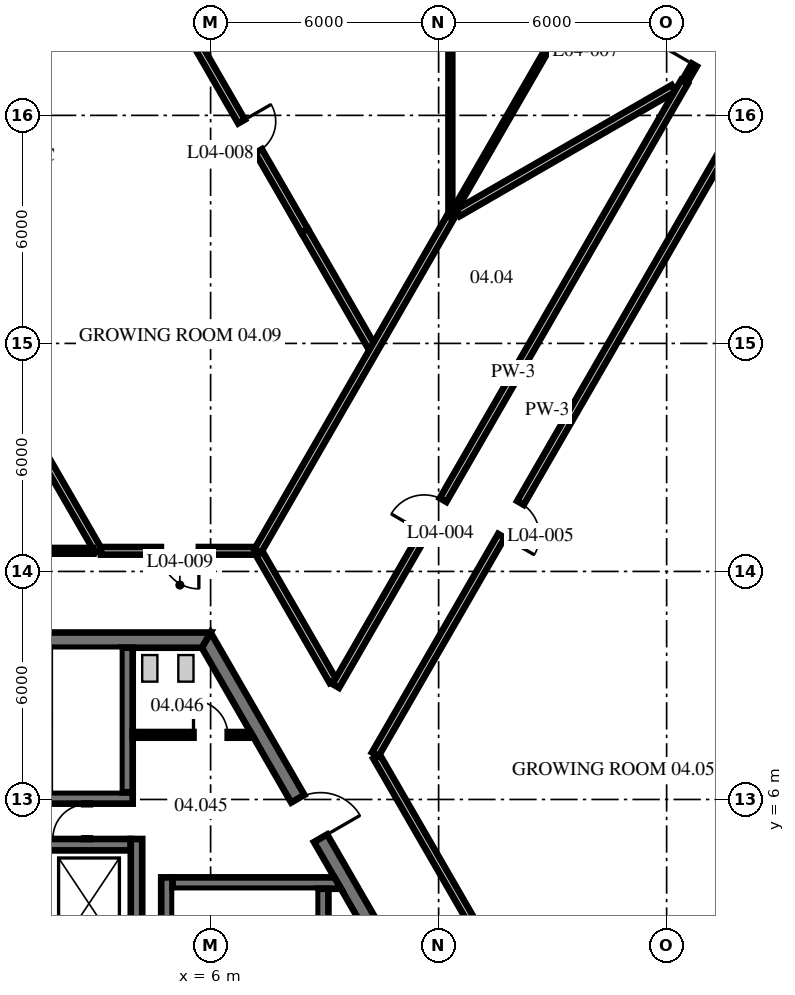
"""IFC4 building model, lengths in metres.
Left out: names, types, materials, properties, quantities, classifications, styles, units other than length and angle.
Written with IfcOpenShell. Run it as: python <this file> out.ifc"""

import sys

from ifc_helpers import new_model, si_unit, direction, frame, frame_2d, origin, place, context, subcontext, project, spatial, polyline, rectangle, outline, extrude, source, transform, mapped, element, fill, save


model = new_model("IFC4")
c1 = context("Model", 3, precision=1e-05, world=origin(), true_north=direction((0.0, 1.0)))
c2 = subcontext(c1, "Body", "Model", "MODEL_VIEW")
j1 = project(units=[si_unit("LENGTHUNIT", "METRE"), si_unit("PLANEANGLEUNIT", "RADIAN")], contexts=[c1])
p1 = place(None, origin())
s1 = spatial("IfcSite", under=j1, at=p1, CompositionType="ELEMENT")
p2 = place(p1, origin())
s2 = spatial("IfcBuilding", under=s1, at=p2, CompositionType="ELEMENT")
p3 = place(p2, frame((0.0, 0.0, 20.3)))
s3 = spatial("IfcBuildingStorey", under=s2, at=p3, CompositionType="ELEMENT", Elevation=20.3)
m1 = source(origin(), c2, "Body", "SweptSolid", [
    extrude(outline(polyline([(-0.115, -0.2), (11.885, -0.2), (11.654, 0.2), (0.115, 0.2), (-0.115, -0.2)])), origin(), (0.0, 0.0, 1.0), 4.1),
])
p4 = place(p3, frame((11.769, 0.0, 0.0), z_axis=(0.0, 0.0, 1.0), x_axis=(-0.499996592174, 0.866027371285, 0.0)))
e1 = element("IfcWall", 1, at=p4, inside=s3, PredefinedType="SHEAR", context=c2, shape_type="MappedRepresentation", body=[
    mapped(m1, transform((0.0, 0.0, 0.0), scale=1.0)),
])
p5 = place(p4, frame((5.75, 0.0, 0.0)))
e2 = element("IfcOpeningElement", 2, at=p5, cuts=e1, PredefinedType="OPENING", context=c2, shape_type="SweptSolid", body=[
    extrude(rectangle(XDim=1.2, YDim=2.1, at=frame_2d((0.6, 1.05))), frame((0.0, 0.21, 0.0), z_axis=(0.0, -1.0, 0.0), x_axis=(1.0, 0.0, 0.0)), (0.0, 0.0, 1.0), 0.42),
])
p6 = place(p3, frame((5.885, 10.192, 0.0), z_axis=(0.0, 0.0, 1.0), x_axis=(-1.0, 0.0, 0.0)))
e3 = element("IfcWall", 3, at=p6, inside=s3, PredefinedType="SHEAR", context=c2, shape_type="MappedRepresentation", body=[
    mapped(m1, transform((0.0, 0.0, 0.0), scale=1.0)),
])
p7 = place(p6, frame((7.985, 0.0, 0.0)))
e4 = element("IfcOpeningElement", 4, at=p7, cuts=e3, PredefinedType="OPENING", context=c2, shape_type="SweptSolid", body=[
    extrude(rectangle(XDim=1.2, YDim=2.1, at=frame_2d((0.6, 1.05))), frame((0.0, 0.21, 0.0), z_axis=(0.0, -1.0, 0.0), x_axis=(1.0, 0.0, 0.0)), (0.0, 0.0, 1.0), 0.42),
])
m2 = source(origin(), c2, "Body", "SweptSolid", [
    extrude(rectangle(XDim=2.5, YDim=0.3, at=frame_2d((1.25, 0.0))), origin(), (0.0, 0.0, 1.0), 4.1),
])
p8 = place(p3, frame((1.4, 4.81, 0.0), z_axis=(0.0, 0.0, 1.0), x_axis=(1.0, 0.0, 0.0)))
e5 = element("IfcWall", 5, at=p8, inside=s3, PredefinedType="SHEAR", context=c2, shape_type="MappedRepresentation", body=[
    mapped(m2, transform((0.0, 0.0, 0.0), scale=1.0)),
])
m3 = source(origin(), c2, "Body", "SweptSolid", [
    extrude(rectangle(XDim=2.9, YDim=0.3, at=frame_2d((1.45, 0.0))), origin(), (0.0, 0.0, 1.0), 4.1),
])
p9 = place(p3, frame((4.05, 2.06, 0.0), z_axis=(0.0, 0.0, 1.0), x_axis=(0.0, 1.0, 0.0)))
e6 = element("IfcWall", 6, at=p9, inside=s3, PredefinedType="SHEAR", context=c2, shape_type="MappedRepresentation", body=[
    mapped(m3, transform((0.0, 0.0, 0.0), scale=1.0)),
])
m4 = source(origin(), c2, "Body", "SweptSolid", [
    extrude(outline(polyline([(-0.15, -0.15), (9.99, -0.15), (9.99, 0.15), (0.15, 0.15), (-0.15, -0.15)])), origin(), (0.0, 0.0, 1.0), 4.1),
])
p10 = place(p3, frame((4.85, -6.04, 0.0), z_axis=(0.0, 0.0, 1.0), x_axis=(0.0, 1.0, 0.0)))
e7 = element("IfcWall", 7, at=p10, inside=s3, PredefinedType="SHEAR", context=c2, shape_type="MappedRepresentation", body=[
    mapped(m4, transform((0.0, 0.0, 0.0), scale=1.0)),
])
p11 = place(p10, frame((3.19, 0.0, 0.0)))
e8 = element("IfcOpeningElement", 8, at=p11, cuts=e7, PredefinedType="OPENING", context=c2, shape_type="SweptSolid", body=[
    extrude(rectangle(XDim=1.1, YDim=2.1, at=frame_2d((0.55, 1.05))), frame((0.0, 0.16, 0.0), z_axis=(0.0, -1.0, 0.0), x_axis=(1.0, 0.0, 0.0)), (0.0, 0.0, 1.0), 0.32),
])
m5 = source(origin(), c2, "Body", "SweptSolid", [
    extrude(outline(polyline([(0.0, -0.15), (0.0, 0.15), (4.26, 0.15), (4.433, -0.15), (0.0, -0.15)])), origin(), (0.0, 0.0, 1.0), 4.1),
])
p12 = place(p3, frame((5.0, 3.8, 0.0), z_axis=(0.0, 0.0, 1.0), x_axis=(1.0, 0.0, 0.0)))
e9 = element("IfcWall", 9, at=p12, inside=s3, PredefinedType="SHEAR", context=c2, shape_type="MappedRepresentation", body=[
    mapped(m5, transform((0.0, 0.0, 0.0), scale=1.0)),
])
m6 = source(origin(), c2, "Body", "SweptSolid", [
    extrude(rectangle(XDim=7.3, YDim=0.3, at=frame_2d((3.65, 0.0))), origin(), (0.0, 0.0, 1.0), 4.1),
])
p13 = place(p3, frame((8.95, -3.65, 0.0), z_axis=(0.0, 0.0, 1.0), x_axis=(0.0, 1.0, 0.0)))
e10 = element("IfcWall", 10, at=p13, inside=s3, PredefinedType="SHEAR", context=c2, shape_type="MappedRepresentation", body=[
    mapped(m6, transform((0.0, 0.0, 0.0), scale=1.0)),
])
m7 = source(origin(), c2, "Body", "SweptSolid", [
    extrude(rectangle(XDim=7.9, YDim=0.3, at=frame_2d((3.95, 0.0))), origin(), (0.0, 0.0, 1.0), 4.1),
])
p14 = place(p3, frame((-3.95, 6.04, 0.0), z_axis=(0.0, 0.0, 1.0), x_axis=(1.0, 0.0, 0.0)))
e11 = element("IfcWall", 11, at=p14, inside=s3, PredefinedType="SHEAR", context=c2, shape_type="MappedRepresentation", body=[
    mapped(m7, transform((0.0, 0.0, 0.0), scale=1.0)),
])
m8 = source(origin(), c2, "Body", "SweptSolid", [
    extrude(outline(polyline([(0.0, -0.15), (0.0, 0.15), (3.804, 0.15), (3.804, -0.15), (0.0, -0.15)])), origin(), (0.0, 0.0, 1.0), 4.1),
])
p15 = place(p3, frame((3.8, 6.19, 0.0), z_axis=(0.0, 0.0, 1.0), x_axis=(0.0, 1.0, 0.0)))
e12 = element("IfcWall", 12, at=p15, inside=s3, PredefinedType="SHEAR", context=c2, shape_type="MappedRepresentation", body=[
    mapped(m8, transform((0.0, 0.0, 0.0), scale=1.0)),
])
m9 = source(origin(), c2, "Body", "SweptSolid", [
    extrude(outline(polyline([(0.0, -0.075), (0.0, 0.075), (3.102, 0.075), (3.188, -0.075), (0.0, -0.075)])), origin(), (0.0, 0.0, 1.0), 4.1),
])
p16 = place(p3, frame((3.95, 7.7, 0.0), z_axis=(0.0, 0.0, 1.0), x_axis=(1.0, 0.0, 0.0)))
e13 = element("IfcWall", 13, at=p16, inside=s3, PredefinedType="PARTITIONING", context=c2, shape_type="MappedRepresentation", body=[
    mapped(m9, transform((0.0, 0.0, 0.0), scale=1.0)),
])
p17 = place(p16, frame((1.6, 0.0, 0.0)))
e14 = element("IfcOpeningElement", 14, at=p17, cuts=e13, PredefinedType="OPENING", context=c2, shape_type="SweptSolid", body=[
    extrude(rectangle(XDim=0.9, YDim=2.1, at=frame_2d((0.45, 1.05))), frame((0.0, 0.085, 0.0), z_axis=(0.0, -1.0, 0.0), x_axis=(1.0, 0.0, 0.0)), (0.0, 0.0, 1.0), 0.17),
])
m10 = source(origin(), c2, "Body", "SweptSolid", [
    extrude(rectangle(XDim=0.93, YDim=0.15, at=frame_2d((0.465, 0.0))), origin(), (0.0, 0.0, 1.0), 4.1),
])
p18 = place(p3, frame((2.75, 4.96, 0.0), z_axis=(0.0, 0.0, 1.0), x_axis=(0.0, 1.0, 0.0)))
e15 = element("IfcWall", 15, at=p18, inside=s3, PredefinedType="PARTITIONING", context=c2, shape_type="MappedRepresentation", body=[
    mapped(m10, transform((0.0, 0.0, 0.0), scale=1.0)),
])
p19 = place(p18, frame((0.015, 0.0, 0.0)))
e16 = element("IfcOpeningElement", 16, at=p19, cuts=e15, PredefinedType="OPENING", context=c2, shape_type="SweptSolid", body=[
    extrude(rectangle(XDim=0.9, YDim=2.1, at=frame_2d((0.45, 1.05))), frame((0.0, 0.085, 0.0), z_axis=(0.0, -1.0, 0.0), x_axis=(1.0, 0.0, 0.0)), (0.0, 0.0, 1.0), 0.17),
])
m11 = source(origin(), c2, "Body", "SweptSolid", [
    extrude(rectangle(XDim=12.148, YDim=0.2, at=frame_2d((6.074, 0.0))), origin(), (0.0, 0.0, 1.0), 3.343),
])
p20 = place(p3, frame((-3.027, 23.063, 0.0), z_axis=(0.0, 0.0, 1.0), x_axis=(0.499997320042, -0.866026951053, 0.0)))
e17 = element("IfcWall", 17, at=p20, inside=s3, PredefinedType="PARTITIONING", context=c2, shape_type="MappedRepresentation", body=[
    mapped(m11, transform((0.0, 0.0, 0.0), scale=1.0)),
])
m12 = source(origin(), c2, "Body", "SweptSolid", [
    extrude(rectangle(XDim=3.885, YDim=0.2, at=frame_2d((1.942, 0.0))), origin(), (0.0, 0.0, 1.0), 4.1),
])
p21 = place(p3, frame((7.276, 12.482, 0.0), z_axis=(0.0, 0.0, 1.0), x_axis=(0.499978127697, -0.866038031396, 0.0)))
e18 = element("IfcWall", 18, at=p21, inside=s3, PredefinedType="PARTITIONING", context=c2, shape_type="MappedRepresentation", body=[
    mapped(m12, transform((0.0, 0.0, 0.0), scale=1.0)),
])
m13 = source(origin(), c2, "Body", "SweptSolid", [
    extrude(rectangle(XDim=8.229, YDim=0.2, at=frame_2d((4.115, 0.0))), origin(), (0.0, 0.0, 1.0), 4.1),
])
p22 = place(p3, frame((10.368, 7.127, 0.0), z_axis=(0.0, 0.0, 1.0), x_axis=(0.500012644715, -0.866018103232, 0.0)))
e19 = element("IfcWall", 19, at=p22, inside=s3, PredefinedType="PARTITIONING", context=c2, shape_type="MappedRepresentation", body=[
    mapped(m13, transform((0.0, 0.0, 0.0), scale=1.0)),
])
m14 = source(origin(), c2, "Body", "SweptSolid", [
    extrude(rectangle(XDim=7.568, YDim=0.2, at=frame_2d((3.784, 0.0))), origin(), (0.0, 0.0, 1.0), 3.488),
])
p23 = place(p3, frame((4.689, 27.518, 0.0), z_axis=(0.0, 0.0, 1.0), x_axis=(0.499997032024, -0.866027117339, 0.0)))
e20 = element("IfcWall", 20, at=p23, inside=s3, PredefinedType="PARTITIONING", context=c2, shape_type="MappedRepresentation", body=[
    mapped(m14, transform((0.0, 0.0, 0.0), scale=1.0)),
])
p24 = place(p23, frame((4.248, 0.0, 0.0)))
e21 = element("IfcOpeningElement", 21, at=p24, cuts=e20, PredefinedType="OPENING", context=c2, shape_type="SweptSolid", body=[
    extrude(rectangle(XDim=0.9, YDim=2.1, at=frame_2d((0.45, 1.05))), frame((0.0, 0.11, 0.0), z_axis=(0.0, -1.0, 0.0), x_axis=(1.0, 0.0, 0.0)), (0.0, 0.0, 1.0), 0.22),
])
m15 = source(origin(), c2, "Body", "SweptSolid", [
    extrude(rectangle(XDim=3.629, YDim=0.2, at=frame_2d((1.815, 0.0))), origin(), (0.0, 0.0, 1.0), 4.1),
])
p25 = place(p3, frame((8.474, 20.963, 0.0), z_axis=(0.0, 0.0, 1.0), x_axis=(0.500009718699, -0.866019792618, 0.0)))
e22 = element("IfcWall", 22, at=p25, inside=s3, PredefinedType="PARTITIONING", context=c2, shape_type="MappedRepresentation", body=[
    mapped(m15, transform((0.0, 0.0, 0.0), scale=1.0)),
])
m16 = source(origin(), c2, "Body", "SweptSolid", [
    extrude(rectangle(XDim=10.155, YDim=0.15, at=frame_2d((5.077, 0.0))), origin(), (0.0, 0.0, 1.0), 4.1),
])
p26 = place(p3, frame((-7.241, 12.542, 0.0), z_axis=(0.0, 0.0, 1.0), x_axis=(1.0, 0.0, 0.0)))
e23 = element("IfcWall", 23, at=p26, inside=s3, PredefinedType="PARTITIONING", context=c2, shape_type="MappedRepresentation", body=[
    mapped(m16, transform((0.0, 0.0, 0.0), scale=1.0)),
])
p27 = place(p26, frame((4.738, 0.0, 0.0)))
e24 = element("IfcOpeningElement", 24, at=p27, cuts=e23, PredefinedType="OPENING", context=c2, shape_type="SweptSolid", body=[
    extrude(rectangle(XDim=0.9, YDim=2.1, at=frame_2d((0.45, 1.05))), frame((0.0, 0.085, 0.0), z_axis=(0.0, -1.0, 0.0), x_axis=(1.0, 0.0, 0.0)), (0.0, 0.0, 1.0), 0.17),
])
m17 = source(origin(), c2, "Body", "SweptSolid", [
    extrude(rectangle(XDim=4.058, YDim=0.2, at=frame_2d((2.029, 0.0))), origin(), (0.0, 0.0, 1.0), 4.1),
])
p28 = place(p3, frame((3.114, 12.542, 0.0), z_axis=(0.0, 0.0, 1.0), x_axis=(1.0, 0.0, 0.0)))
e25 = element("IfcWall", 25, at=p28, inside=s3, PredefinedType="PARTITIONING", context=c2, shape_type="MappedRepresentation", body=[
    mapped(m17, transform((0.0, 0.0, 0.0), scale=1.0)),
])
p29 = place(p28, frame((1.578, 0.0, 0.0)))
e26 = element("IfcOpeningElement", 26, at=p29, cuts=e25, PredefinedType="OPENING", context=c2, shape_type="SweptSolid", body=[
    extrude(rectangle(XDim=1.0, YDim=2.1, at=frame_2d((0.5, 1.05))), frame((0.0, 0.11, 0.0), z_axis=(0.0, -1.0, 0.0), x_axis=(1.0, 0.0, 0.0)), (0.0, 0.0, 1.0), 0.22),
])
m18 = source(origin(), c2, "Body", "SweptSolid", [
    extrude(rectangle(XDim=6.55, YDim=0.2, at=frame_2d((3.275, 0.0))), origin(), (0.0, 0.0, 1.0), 4.1),
])
p30 = place(p3, frame((12.508, 21.435, 0.0), z_axis=(0.0, 0.0, 1.0), x_axis=(0.866021102686, 0.500007449647, 0.0)))
e27 = element("IfcWall", 27, at=p30, inside=s3, PredefinedType="PARTITIONING", context=c2, shape_type="MappedRepresentation", body=[
    mapped(m18, transform((0.0, 0.0, 0.0), scale=1.0)),
])
m19 = source(origin(), c2, "Body", "SweptSolid", [
    extrude(rectangle(XDim=20.193, YDim=0.2, at=frame_2d((10.096, 0.0))), origin(), (0.0, 0.0, 1.0), 4.1),
])
p31 = place(p3, frame((10.333, 7.187, 0.0), z_axis=(0.0, 0.0, 1.0), x_axis=(0.499999796593, 0.866025521222, 0.0)))
e28 = element("IfcWall", 28, at=p31, inside=s3, PredefinedType="PARTITIONING", context=c2, shape_type="MappedRepresentation", body=[
    mapped(m19, transform((0.0, 0.0, 0.0), scale=1.0)),
])
p32 = place(p31, frame((6.639, 0.0, 0.0)))
e29 = element("IfcOpeningElement", 29, at=p32, cuts=e28, PredefinedType="OPENING", context=c2, shape_type="SweptSolid", body=[
    extrude(rectangle(XDim=1.0, YDim=2.1, at=frame_2d((0.5, 1.05))), frame((0.0, 0.11, 0.0), z_axis=(0.0, -1.0, 0.0), x_axis=(1.0, 0.0, 0.0)), (0.0, 0.0, 1.0), 0.22),
])
m20 = source(origin(), c2, "Body", "SweptSolid", [
    extrude(rectangle(XDim=18.352, YDim=0.2, at=frame_2d((9.176, 0.0))), origin(), (0.0, 0.0, 1.0), 4.1),
])
p33 = place(p3, frame((9.294, 8.987, 0.0), z_axis=(0.0, 0.0, 1.0), x_axis=(0.500002290144, 0.866024081565, 0.0)))
e30 = element("IfcWall", 30, at=p33, inside=s3, PredefinedType="PARTITIONING", context=c2, shape_type="MappedRepresentation", body=[
    mapped(m20, transform((0.0, 0.0, 0.0), scale=1.0)),
])
p34 = place(p33, frame((4.649, 0.0, 0.0)))
e31 = element("IfcOpeningElement", 31, at=p34, cuts=e30, PredefinedType="OPENING", context=c2, shape_type="SweptSolid", body=[
    extrude(rectangle(XDim=1.0, YDim=2.1, at=frame_2d((0.5, 1.05))), frame((0.0, 0.11, 0.0), z_axis=(0.0, -1.0, 0.0), x_axis=(1.0, 0.0, 0.0)), (0.0, 0.0, 1.0), 0.22),
])
m21 = source(origin(), c2, "Body", "SweptSolid", [
    extrude(rectangle(XDim=1.955, YDim=0.15, at=frame_2d((0.978, 0.0))), origin(), (0.0, 0.0, 1.0), 4.1),
])
p35 = place(p3, frame((18.47, 24.88, 0.0), z_axis=(0.0, 0.0, 1.0), x_axis=(0.500061185694, 0.865990075325, 0.0)))
e32 = element("IfcWall", 32, at=p35, inside=s3, PredefinedType="PARTITIONING", context=c2, shape_type="MappedRepresentation", body=[
    mapped(m21, transform((0.0, 0.0, 0.0), scale=1.0)),
])
p36 = place(p35, frame((0.517, 0.0, 0.0)))
e33 = element("IfcOpeningElement", 33, at=p36, cuts=e32, PredefinedType="OPENING", context=c2, shape_type="SweptSolid", body=[
    extrude(rectangle(XDim=0.9, YDim=2.1, at=frame_2d((0.45, 1.05))), frame((0.0, 0.085, 0.0), z_axis=(0.0, -1.0, 0.0), x_axis=(1.0, 0.0, 0.0)), (0.0, 0.0, 1.0), 0.17),
])
m22 = source(origin(), c2, "Body", "SweptSolid", [
    extrude(rectangle(XDim=10.136, YDim=0.2, at=frame_2d((5.068, 0.0))), origin(), (0.0, 0.0, 1.0), 4.1),
])
p37 = place(p3, frame((7.241, 12.542, 0.0), z_axis=(0.0, 0.0, 1.0), x_axis=(0.49999906822, 0.866025941747, 0.0)))
e34 = element("IfcWall", 34, at=p37, inside=s3, PredefinedType="PARTITIONING", context=c2, shape_type="MappedRepresentation", body=[
    mapped(m22, transform((0.0, 0.0, 0.0), scale=1.0)),
])
m23 = source(origin(), c2, "Body", "SweptSolid", [
    extrude(rectangle(XDim=9.027, YDim=0.1, at=frame_2d((4.514, 0.0))), origin(), (0.0, 0.0, 1.0), 4.1),
])
p38 = place(p3, frame((12.384, 21.45, 0.0), z_axis=(0.0, 0.0, 1.0), x_axis=(0.500013529965, 0.866017592115, 0.0)))
e35 = element("IfcWall", 35, at=p38, inside=s3, PredefinedType="PARTITIONING", context=c2, shape_type="MappedRepresentation", body=[
    mapped(m23, transform((0.0, 0.0, 0.0), scale=1.0)),
])
p39 = place(p38, frame((4.962, 0.0, 0.0)))
e36 = element("IfcOpeningElement", 36, at=p39, cuts=e35, PredefinedType="OPENING", context=c2, shape_type="SweptSolid", body=[
    extrude(rectangle(XDim=0.9, YDim=2.1, at=frame_2d((0.45, 1.05))), frame((0.0, 0.06, 0.0), z_axis=(0.0, -1.0, 0.0), x_axis=(1.0, 0.0, 0.0)), (0.0, 0.0, 1.0), 0.12),
])
m24 = source(origin(), c2, "Body", "SweptSolid", [
    extrude(rectangle(XDim=9.446, YDim=0.1, at=frame_2d((4.723, 0.0))), origin(), (0.0, 0.0, 1.0), 4.1),
])
p40 = place(p3, frame((12.309, 21.32, 0.0), z_axis=(0.0, 0.0, 1.0), x_axis=(0.0, 1.0, 0.0)))
e37 = element("IfcWall", 37, at=p40, inside=s3, PredefinedType="PARTITIONING", context=c2, shape_type="MappedRepresentation", body=[
    mapped(m24, transform((0.0, 0.0, 0.0), scale=1.0)),
])
p41 = place(p5, frame((1.2, 0.0, 0.0), z_axis=(0.0, 0.0, 1.0), x_axis=(-1.0, 0.0, 0.0)))
e38 = element("IfcDoor", 38, at=p41, inside=s3, OperationType="SINGLE_SWING_RIGHT", PredefinedType="DOOR", context=c2, shape_type="SweptSolid", body=[
    extrude(rectangle(XDim=1.2, YDim=2.1, at=frame_2d((0.6, 1.05))), frame((0.0, 0.025, 0.0), z_axis=(0.0, -1.0, 0.0), x_axis=(1.0, 0.0, 0.0)), (0.0, 0.0, 1.0), 0.05),
])
fill(e2, e38)
p42 = place(p19, origin())
e39 = element("IfcDoor", 39, at=p42, inside=s3, OperationType="SINGLE_SWING_LEFT", PredefinedType="DOOR", context=c2, shape_type="SweptSolid", body=[
    extrude(rectangle(XDim=0.9, YDim=2.1, at=frame_2d((0.45, 1.05))), frame((0.0, 0.025, 0.0), z_axis=(0.0, -1.0, 0.0), x_axis=(1.0, 0.0, 0.0)), (0.0, 0.0, 1.0), 0.05),
])
fill(e16, e39)
p43 = place(p17, origin())
e40 = element("IfcDoor", 40, at=p43, inside=s3, OperationType="SINGLE_SWING_LEFT", PredefinedType="DOOR", context=c2, shape_type="SweptSolid", body=[
    extrude(rectangle(XDim=0.9, YDim=2.1, at=frame_2d((0.45, 1.05))), frame((0.0, 0.025, 0.0), z_axis=(0.0, -1.0, 0.0), x_axis=(1.0, 0.0, 0.0)), (0.0, 0.0, 1.0), 0.05),
])
fill(e14, e40)
p44 = place(p34, origin())
e41 = element("IfcDoor", 41, at=p44, inside=s3, OperationType="SINGLE_SWING_LEFT", PredefinedType="DOOR", context=c2, shape_type="SweptSolid", body=[
    extrude(rectangle(XDim=1.0, YDim=2.1, at=frame_2d((0.5, 1.05))), frame((0.0, 0.025, 0.0), z_axis=(0.0, -1.0, 0.0), x_axis=(1.0, 0.0, 0.0)), (0.0, 0.0, 1.0), 0.05),
])
fill(e31, e41)
p45 = place(p32, origin())
e42 = element("IfcDoor", 42, at=p45, inside=s3, OperationType="SINGLE_SWING_RIGHT", PredefinedType="DOOR", context=c2, shape_type="SweptSolid", body=[
    extrude(rectangle(XDim=1.0, YDim=2.1, at=frame_2d((0.5, 1.05))), frame((0.0, 0.025, 0.0), z_axis=(0.0, -1.0, 0.0), x_axis=(1.0, 0.0, 0.0)), (0.0, 0.0, 1.0), 0.05),
])
fill(e29, e42)
p46 = place(p36, origin())
e43 = element("IfcDoor", 43, at=p46, inside=s3, OperationType="SINGLE_SWING_LEFT", PredefinedType="DOOR", context=c2, shape_type="SweptSolid", body=[
    extrude(rectangle(XDim=0.9, YDim=2.1, at=frame_2d((0.45, 1.05))), frame((0.0, 0.025, 0.0), z_axis=(0.0, -1.0, 0.0), x_axis=(1.0, 0.0, 0.0)), (0.0, 0.0, 1.0), 0.05),
])
fill(e33, e43)
p47 = place(p24, origin())
e44 = element("IfcDoor", 44, at=p47, inside=s3, OperationType="SINGLE_SWING_LEFT", PredefinedType="DOOR", context=c2, shape_type="SweptSolid", body=[
    extrude(rectangle(XDim=0.9, YDim=2.1, at=frame_2d((0.45, 1.05))), frame((0.0, 0.025, 0.0), z_axis=(0.0, -1.0, 0.0), x_axis=(1.0, 0.0, 0.0)), (0.0, 0.0, 1.0), 0.05),
])
fill(e21, e44)
p48 = place(p29, origin())
e45 = element("IfcDoor", 45, at=p48, inside=s3, OperationType="SINGLE_SWING_RIGHT", PredefinedType="DOOR", context=c2, shape_type="SweptSolid", body=[
    extrude(rectangle(XDim=1.0, YDim=2.1, at=frame_2d((0.5, 1.05))), frame((0.0, 0.025, 0.0), z_axis=(0.0, -1.0, 0.0), x_axis=(1.0, 0.0, 0.0)), (0.0, 0.0, 1.0), 0.05),
])
fill(e26, e45)
save(model, sys.argv[1])
